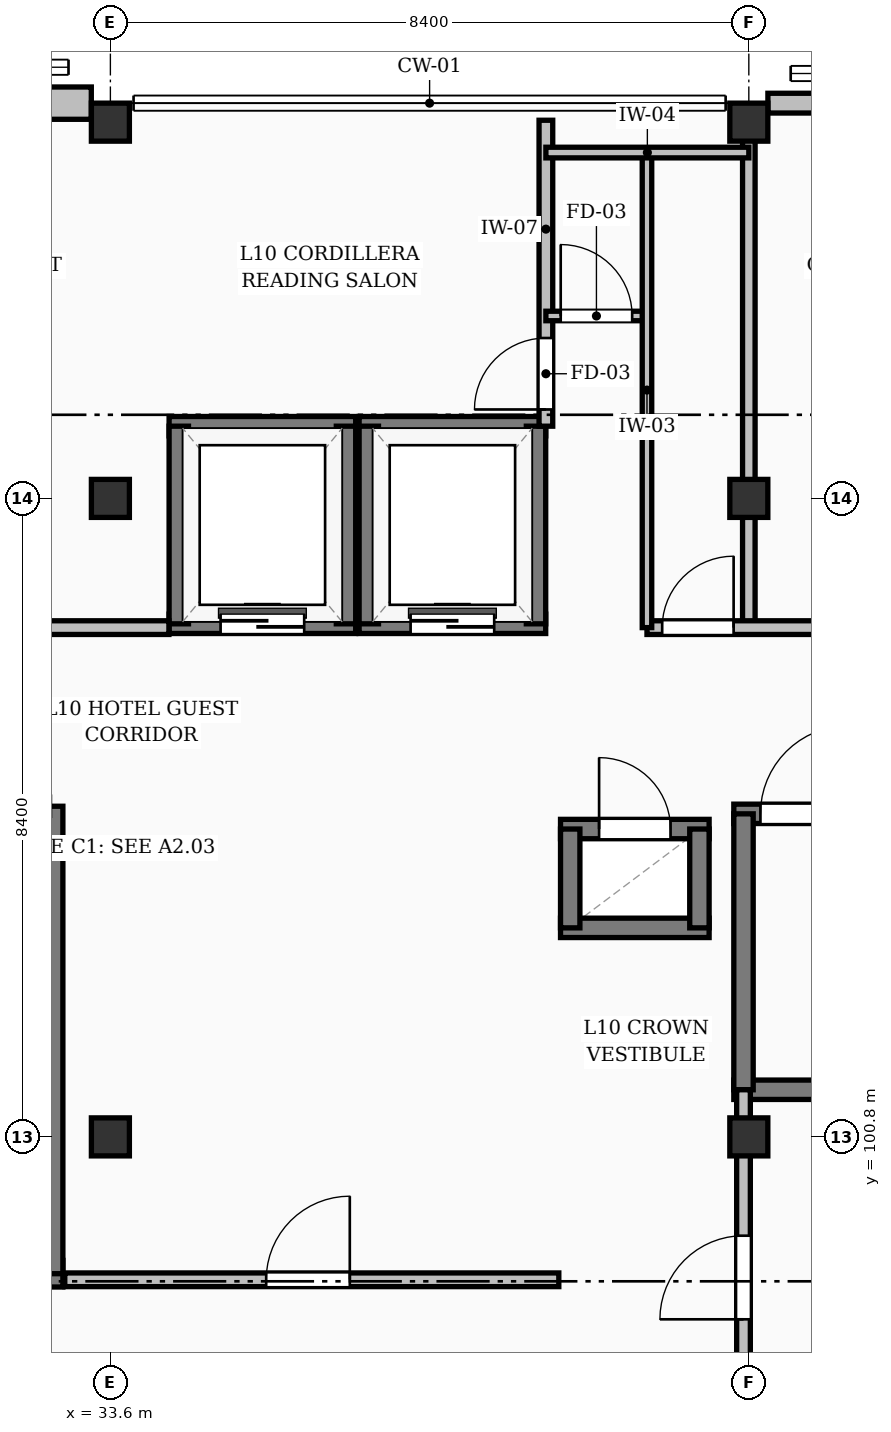
"""IFC4 building model, lengths in metres.
Left out: names, types, materials, properties, quantities, classifications, styles, units other than length and angle.
Written with IfcOpenShell. Run it as: python <this file> out.ifc"""

import sys

from ifc_helpers import new_model, si_unit, direction, frame, frame_2d, origin, origin_2d, place, context, subcontext, project, spatial, rectangle, extrude, element, fill, save


model = new_model("IFC4")
c1 = context("Model", 3, precision=1e-05, world=origin(), true_north=direction((0.0, 1.0)))
c2 = subcontext(c1, "Body", "Model", "MODEL_VIEW")
j1 = project(units=[si_unit("LENGTHUNIT", "METRE"), si_unit("PLANEANGLEUNIT", "RADIAN")], contexts=[c1])
p1 = place(None, origin())
s1 = spatial("IfcSite", under=j1, at=p1, CompositionType="ELEMENT")
p2 = place(p1, origin())
s2 = spatial("IfcBuilding", under=s1, at=p2, CompositionType="ELEMENT")
p3 = place(p2, frame((0.0, 0.0, 35.28)))
s3 = spatial("IfcBuildingStorey", under=s2, at=p3, CompositionType="ELEMENT", Elevation=35.28)
for number, where, z_axis, x_axis in (
    (1, (33.6, 100.8, 0.0), (0.0, 0.0, 1.0), (1.0, 0.0, 0.0)),
    (2, (33.6, 109.2, 0.0), (0.0, 0.0, 1.0), (1.0, 0.0, 0.0)),
    (3, (33.6, 114.15, 0.0), (0.0, 0.0, 1.0), (1.0, 0.0, 0.0)),
    (4, (42.0, 100.8, 0.0), (0.0, 0.0, 1.0), (1.0, 0.0, 0.0)),
    (5, (42.0, 109.2, 0.0), (0.0, 0.0, 1.0), (1.0, 0.0, 0.0)),
    (6, (42.0, 114.15, 0.0), (0.0, 0.0, 1.0), (1.0, 0.0, 0.0)),
):
    element("IfcColumn", number, at=place(p3, frame(where, z_axis=z_axis, x_axis=x_axis)), inside=s3, PredefinedType="COLUMN", context=c2, shape_type="SweptSolid", body=[
        extrude(rectangle(XDim=0.5, YDim=0.5, at=origin_2d()), origin(), (0.0, 0.0, 1.0), 3.36),
    ])
p4 = place(p3, frame((26.425, 99.0, 0.0), z_axis=(0.0, 0.0, 1.0), x_axis=(1.0, 0.0, 0.0)))
e7 = element("IfcWall", 7, at=p4, inside=s3, PredefinedType="SHEAR", context=c2, shape_type="SweptSolid", body=[
    extrude(rectangle(XDim=6.55, YDim=0.35, at=frame_2d((3.275, 0.0))), origin(), (0.0, 0.0, 1.0), 3.14),
])
p5 = place(p3, frame((32.8, 99.0, 0.0), z_axis=(0.0, 0.0, 1.0), x_axis=(0.0, 1.0, 0.0)))
e8 = element("IfcWall", 8, at=p5, inside=s3, PredefinedType="SHEAR", context=c2, shape_type="SweptSolid", body=[
    extrude(rectangle(XDim=6.15, YDim=0.35, at=frame_2d((3.075, 0.0))), origin(), (0.0, 0.0, 1.0), 3.14),
])
p6 = place(p3, frame((25.451, 114.4, 0.0), z_axis=(0.0, 0.0, 1.0), x_axis=(1.0, 0.0, 0.0)))
e9 = element("IfcWall", 9, at=p6, inside=s3, PredefinedType="SOLIDWALL", context=c2, shape_type="SweptSolid", body=[
    extrude(rectangle(XDim=7.898, YDim=0.425, at=frame_2d((3.949, 0.0))), origin(), (0.0, 0.0, 1.0), 2.514),
])
p7 = place(p6, frame((0.724, 0.0, 0.25)))
e10 = element("IfcOpeningElement", 10, at=p7, cuts=e9, PredefinedType="OPENING", context=c2, shape_type="SweptSolid", body=[
    extrude(rectangle(XDim=2.25, YDim=1.85, at=frame_2d((1.125, 0.925))), frame((0.0, 0.223, 0.0), z_axis=(0.0, -1.0, 0.0), x_axis=(1.0, 0.0, 0.0)), (0.0, 0.0, 1.0), 0.445),
])
p8 = place(p6, frame((4.924, 0.0, 0.25)))
e11 = element("IfcOpeningElement", 11, at=p8, cuts=e9, PredefinedType="OPENING", context=c2, shape_type="SweptSolid", body=[
    extrude(rectangle(XDim=2.25, YDim=1.95, at=frame_2d((1.125, 0.975))), frame((0.0, 0.223, 0.0), z_axis=(0.0, -1.0, 0.0), x_axis=(1.0, 0.0, 0.0)), (0.0, 0.0, 1.0), 0.445),
])
p9 = place(p3, frame((42.251, 114.4, 0.0), z_axis=(0.0, 0.0, 1.0), x_axis=(1.0, 0.0, 0.0)))
e12 = element("IfcWall", 12, at=p9, inside=s3, PredefinedType="SOLIDWALL", context=c2, shape_type="SweptSolid", body=[
    extrude(rectangle(XDim=7.898, YDim=0.26, at=frame_2d((3.949, 0.0))), origin(), (0.0, 0.0, 1.0), 2.514),
])
p10 = place(p9, frame((0.724, 0.0, 0.25)))
e13 = element("IfcOpeningElement", 13, at=p10, cuts=e12, PredefinedType="OPENING", context=c2, shape_type="SweptSolid", body=[
    extrude(rectangle(XDim=2.25, YDim=1.95, at=frame_2d((1.125, 0.975))), frame((0.0, 0.14, 0.0), z_axis=(0.0, -1.0, 0.0), x_axis=(1.0, 0.0, 0.0)), (0.0, 0.0, 1.0), 0.28),
])
p11 = place(p9, frame((4.924, 0.0, 0.25)))
e14 = element("IfcOpeningElement", 14, at=p11, cuts=e12, PredefinedType="OPENING", context=c2, shape_type="SweptSolid", body=[
    extrude(rectangle(XDim=2.25, YDim=2.05, at=frame_2d((1.125, 1.025))), frame((0.0, 0.14, 0.0), z_axis=(0.0, -1.0, 0.0), x_axis=(1.0, 0.0, 0.0)), (0.0, 0.0, 1.0), 0.28),
])
p12 = place(p3, frame((41.802, 101.42, 0.0), z_axis=(0.0, 0.0, 1.0), x_axis=(1.0, 0.0, 0.0)))
e15 = element("IfcWall", 15, at=p12, inside=s3, PredefinedType="SOLIDWALL", context=c2, shape_type="SweptSolid", body=[
    extrude(rectangle(XDim=8.225, YDim=0.255, at=frame_2d((4.113, 0.0))), origin(), (0.0, 0.0, 1.0), 3.14),
])
p13 = place(p3, frame((41.802, 105.05, 0.0), z_axis=(0.0, 0.0, 1.0), x_axis=(1.0, 0.0, 0.0)))
e16 = element("IfcWall", 16, at=p13, inside=s3, PredefinedType="SOLIDWALL", context=c2, shape_type="SweptSolid", body=[
    extrude(rectangle(XDim=8.225, YDim=0.255, at=frame_2d((4.113, 0.0))), origin(), (0.0, 0.0, 1.0), 3.14),
])
p14 = place(p13, frame((0.35, 0.0, 0.0)))
e17 = element("IfcOpeningElement", 17, at=p14, cuts=e16, PredefinedType="OPENING", context=c2, shape_type="SweptSolid", body=[
    extrude(rectangle(XDim=1.16, YDim=2.15, at=frame_2d((0.58, 1.075))), frame((0.0, 0.137, 0.0), z_axis=(0.0, -1.0, 0.0), x_axis=(1.0, 0.0, 0.0)), (0.0, 0.0, 1.0), 0.275),
])
p15 = place(p3, frame((41.93, 101.42, 0.0), z_axis=(0.0, 0.0, 1.0), x_axis=(0.0, 1.0, 0.0)))
e18 = element("IfcWall", 18, at=p15, inside=s3, PredefinedType="SOLIDWALL", context=c2, shape_type="SweptSolid", body=[
    extrude(rectangle(XDim=3.63, YDim=0.255, at=frame_2d((1.815, 0.0))), origin(), (0.0, 0.0, 1.0), 3.14),
])
p16 = place(p3, frame((34.373, 107.55, 0.0), z_axis=(0.0, 0.0, 1.0), x_axis=(1.0, 0.0, 0.0)))
e19 = element("IfcWall", 19, at=p16, inside=s3, PredefinedType="SOLIDWALL", context=c2, shape_type="SweptSolid", body=[
    extrude(rectangle(XDim=2.455, YDim=0.255, at=frame_2d((1.228, 0.0))), origin(), (0.0, 0.0, 1.0), 3.14),
])
p17 = place(p16, frame((0.677, 0.0, 0.0)))
e20 = element("IfcOpeningElement", 20, at=p17, cuts=e19, PredefinedType="OPENING", context=c2, shape_type="SweptSolid", body=[
    extrude(rectangle(XDim=1.1, YDim=2.15, at=frame_2d((0.55, 1.075))), frame((0.0, 0.137, 0.0), z_axis=(0.0, -1.0, 0.0), x_axis=(1.0, 0.0, 0.0)), (0.0, 0.0, 1.0), 0.275),
])
p18 = place(p3, frame((34.373, 110.15, 0.0), z_axis=(0.0, 0.0, 1.0), x_axis=(1.0, 0.0, 0.0)))
e21 = element("IfcWall", 21, at=p18, inside=s3, PredefinedType="SOLIDWALL", context=c2, shape_type="SweptSolid", body=[
    extrude(rectangle(XDim=2.455, YDim=0.255, at=frame_2d((1.228, 0.0))), origin(), (0.0, 0.0, 1.0), 3.14),
])
for number, where, z_axis, x_axis in (
    (22, (34.5, 107.55, 0.0), (0.0, 0.0, 1.0), (0.0, 1.0, 0.0)),
    (23, (36.7, 107.55, 0.0), (0.0, 0.0, 1.0), (0.0, 1.0, 0.0)),
):
    element("IfcWall", number, at=place(p3, frame(where, z_axis=z_axis, x_axis=x_axis)), inside=s3, PredefinedType="SOLIDWALL", context=c2, shape_type="SweptSolid", body=[
        extrude(rectangle(XDim=2.6, YDim=0.255, at=frame_2d((1.3, 0.0))), origin(), (0.0, 0.0, 1.0), 3.14),
    ])
p19 = place(p3, frame((36.873, 107.55, 0.0), z_axis=(0.0, 0.0, 1.0), x_axis=(1.0, 0.0, 0.0)))
e24 = element("IfcWall", 24, at=p19, inside=s3, PredefinedType="SOLIDWALL", context=c2, shape_type="SweptSolid", body=[
    extrude(rectangle(XDim=2.455, YDim=0.255, at=frame_2d((1.228, 0.0))), origin(), (0.0, 0.0, 1.0), 3.14),
])
p20 = place(p19, frame((0.677, 0.0, 0.0)))
e25 = element("IfcOpeningElement", 25, at=p20, cuts=e24, PredefinedType="OPENING", context=c2, shape_type="SweptSolid", body=[
    extrude(rectangle(XDim=1.1, YDim=2.15, at=frame_2d((0.55, 1.075))), frame((0.0, 0.137, 0.0), z_axis=(0.0, -1.0, 0.0), x_axis=(1.0, 0.0, 0.0)), (0.0, 0.0, 1.0), 0.275),
])
p21 = place(p3, frame((36.873, 110.15, 0.0), z_axis=(0.0, 0.0, 1.0), x_axis=(1.0, 0.0, 0.0)))
e26 = element("IfcWall", 26, at=p21, inside=s3, PredefinedType="SOLIDWALL", context=c2, shape_type="SweptSolid", body=[
    extrude(rectangle(XDim=2.455, YDim=0.255, at=frame_2d((1.228, 0.0))), origin(), (0.0, 0.0, 1.0), 3.14),
])
for number, where, z_axis, x_axis in (
    (27, (37.0, 107.55, 0.0), (0.0, 0.0, 1.0), (0.0, 1.0, 0.0)),
    (28, (39.2, 107.55, 0.0), (0.0, 0.0, 1.0), (0.0, 1.0, 0.0)),
):
    element("IfcWall", number, at=place(p3, frame(where, z_axis=z_axis, x_axis=x_axis)), inside=s3, PredefinedType="SOLIDWALL", context=c2, shape_type="SweptSolid", body=[
        extrude(rectangle(XDim=2.6, YDim=0.255, at=frame_2d((1.3, 0.0))), origin(), (0.0, 0.0, 1.0), 3.14),
    ])
p22 = place(p3, frame((39.522, 103.55, 0.0), z_axis=(0.0, 0.0, 1.0), x_axis=(1.0, 0.0, 0.0)))
e29 = element("IfcWall", 29, at=p22, inside=s3, PredefinedType="SOLIDWALL", context=c2, shape_type="SweptSolid", body=[
    extrude(rectangle(XDim=1.955, YDim=0.255, at=frame_2d((0.978, 0.0))), origin(), (0.0, 0.0, 1.0), 3.14),
])
p23 = place(p3, frame((39.522, 104.85, 0.0), z_axis=(0.0, 0.0, 1.0), x_axis=(1.0, 0.0, 0.0)))
e30 = element("IfcWall", 30, at=p23, inside=s3, PredefinedType="SOLIDWALL", context=c2, shape_type="SweptSolid", body=[
    extrude(rectangle(XDim=1.955, YDim=0.255, at=frame_2d((0.978, 0.0))), origin(), (0.0, 0.0, 1.0), 3.14),
])
p24 = place(p23, frame((0.508, 0.0, 0.0)))
e31 = element("IfcOpeningElement", 31, at=p24, cuts=e30, PredefinedType="OPENING", context=c2, shape_type="SweptSolid", body=[
    extrude(rectangle(XDim=0.94, YDim=2.1, at=frame_2d((0.47, 1.05))), frame((0.0, 0.137, 0.0), z_axis=(0.0, -1.0, 0.0), x_axis=(1.0, 0.0, 0.0)), (0.0, 0.0, 1.0), 0.275),
])
for number, where, z_axis, x_axis in (
    (32, (39.65, 103.55, 0.0), (0.0, 0.0, 1.0), (0.0, 1.0, 0.0)),
    (33, (41.35, 103.55, 0.0), (0.0, 0.0, 1.0), (0.0, 1.0, 0.0)),
):
    element("IfcWall", number, at=place(p3, frame(where, z_axis=z_axis, x_axis=x_axis)), inside=s3, PredefinedType="SOLIDWALL", context=c2, shape_type="SweptSolid", body=[
        extrude(rectangle(XDim=1.3, YDim=0.255, at=frame_2d((0.65, 0.0))), origin(), (0.0, 0.0, 1.0), 3.14),
    ])
p25 = place(p3, frame((42.0, 107.5, 0.0), z_axis=(0.0, 0.0, 1.0), x_axis=(0.0, 1.0, 0.0)))
e34 = element("IfcWall", 34, at=p25, inside=s3, PredefinedType="PARTITIONING", context=c2, shape_type="SweptSolid", body=[
    extrude(rectangle(XDim=6.55, YDim=0.165, at=frame_2d((3.275, 0.0))), origin(), (0.0, 0.0, 1.0), 2.514),
])
p26 = place(p3, frame((8.59, 107.5, 0.0), z_axis=(0.0, 0.0, 1.0), x_axis=(1.0, 0.0, 0.0)))
e35 = element("IfcWall", 35, at=p26, inside=s3, PredefinedType="PARTITIONING", context=c2, shape_type="SweptSolid", body=[
    extrude(rectangle(XDim=25.78, YDim=0.18, at=frame_2d((12.89, 0.0))), origin(), (0.0, 0.0, 1.0), 3.14),
])
p27 = place(p26, frame((1.31, 0.0, 0.0)))
e36 = element("IfcOpeningElement", 36, at=p27, cuts=e35, PredefinedType="OPENING", context=c2, shape_type="SweptSolid", body=[
    extrude(rectangle(XDim=1.02, YDim=2.15, at=frame_2d((0.51, 1.075))), frame((0.0, 0.1, 0.0), z_axis=(0.0, -1.0, 0.0), x_axis=(1.0, 0.0, 0.0)), (0.0, 0.0, 1.0), 0.2),
])
p28 = place(p26, frame((9.58, 0.0, 0.0)))
e37 = element("IfcOpeningElement", 37, at=p28, cuts=e35, PredefinedType="OPENING", context=c2, shape_type="SweptSolid", body=[
    extrude(rectangle(XDim=0.96, YDim=2.15, at=frame_2d((0.48, 1.075))), frame((0.0, 0.1, 0.0), z_axis=(0.0, -1.0, 0.0), x_axis=(1.0, 0.0, 0.0)), (0.0, 0.0, 1.0), 0.2),
])
p29 = place(p26, frame((14.24, 0.0, 0.0)))
e38 = element("IfcOpeningElement", 38, at=p29, cuts=e35, PredefinedType="OPENING", context=c2, shape_type="SweptSolid", body=[
    extrude(rectangle(XDim=0.96, YDim=2.15, at=frame_2d((0.48, 1.075))), frame((0.0, 0.1, 0.0), z_axis=(0.0, -1.0, 0.0), x_axis=(1.0, 0.0, 0.0)), (0.0, 0.0, 1.0), 0.2),
])
p30 = place(p26, frame((17.98, 0.0, 0.0)))
e39 = element("IfcOpeningElement", 39, at=p30, cuts=e35, PredefinedType="OPENING", context=c2, shape_type="SweptSolid", body=[
    extrude(rectangle(XDim=0.96, YDim=2.15, at=frame_2d((0.48, 1.075))), frame((0.0, 0.1, 0.0), z_axis=(0.0, -1.0, 0.0), x_axis=(1.0, 0.0, 0.0)), (0.0, 0.0, 1.0), 0.2),
])
p31 = place(p26, frame((22.64, 0.0, 0.0)))
e40 = element("IfcOpeningElement", 40, at=p31, cuts=e35, PredefinedType="OPENING", context=c2, shape_type="SweptSolid", body=[
    extrude(rectangle(XDim=0.96, YDim=2.15, at=frame_2d((0.48, 1.075))), frame((0.0, 0.1, 0.0), z_axis=(0.0, -1.0, 0.0), x_axis=(1.0, 0.0, 0.0)), (0.0, 0.0, 1.0), 0.2),
])
p32 = place(p3, frame((40.66, 107.5, 0.0), z_axis=(0.0, 0.0, 1.0), x_axis=(1.0, 0.0, 0.0)))
e41 = element("IfcWall", 41, at=p32, inside=s3, PredefinedType="PARTITIONING", context=c2, shape_type="SweptSolid", body=[
    extrude(rectangle(XDim=9.55, YDim=0.18, at=frame_2d((4.775, 0.0))), origin(), (0.0, 0.0, 1.0), 3.14),
])
p33 = place(p32, frame((0.2, 0.0, 0.0)))
e42 = element("IfcOpeningElement", 42, at=p33, cuts=e41, PredefinedType="OPENING", context=c2, shape_type="SweptSolid", body=[
    extrude(rectangle(XDim=0.94, YDim=2.1, at=frame_2d((0.47, 1.05))), frame((0.0, 0.1, 0.0), z_axis=(0.0, -1.0, 0.0), x_axis=(1.0, 0.0, 0.0)), (0.0, 0.0, 1.0), 0.2),
])
p34 = place(p32, frame((2.71, 0.0, 0.0)))
e43 = element("IfcOpeningElement", 43, at=p34, cuts=e41, PredefinedType="OPENING", context=c2, shape_type="SweptSolid", body=[
    extrude(rectangle(XDim=0.96, YDim=2.15, at=frame_2d((0.48, 1.075))), frame((0.0, 0.1, 0.0), z_axis=(0.0, -1.0, 0.0), x_axis=(1.0, 0.0, 0.0)), (0.0, 0.0, 1.0), 0.2),
])
p35 = place(p32, frame((7.37, 0.0, 0.0)))
e44 = element("IfcOpeningElement", 44, at=p35, cuts=e41, PredefinedType="OPENING", context=c2, shape_type="SweptSolid", body=[
    extrude(rectangle(XDim=0.96, YDim=2.15, at=frame_2d((0.48, 1.075))), frame((0.0, 0.1, 0.0), z_axis=(0.0, -1.0, 0.0), x_axis=(1.0, 0.0, 0.0)), (0.0, 0.0, 1.0), 0.2),
])
p36 = place(p3, frame((39.33, 110.15, 0.0), z_axis=(0.0, 0.0, 1.0), x_axis=(0.0, 1.0, 0.0)))
e45 = element("IfcWall", 45, at=p36, inside=s3, PredefinedType="PARTITIONING", context=c2, shape_type="SweptSolid", body=[
    extrude(rectangle(XDim=4.025, YDim=0.18, at=frame_2d((2.013, 0.0))), origin(), (0.0, 0.0, 1.0), 3.14),
])
p37 = place(p36, frame((0.22, 0.0, 0.0)))
e46 = element("IfcOpeningElement", 46, at=p37, cuts=e45, PredefinedType="OPENING", context=c2, shape_type="SweptSolid", body=[
    extrude(rectangle(XDim=0.94, YDim=2.1, at=frame_2d((0.47, 1.05))), frame((0.0, 0.1, 0.0), z_axis=(0.0, -1.0, 0.0), x_axis=(1.0, 0.0, 0.0)), (0.0, 0.0, 1.0), 0.2),
])
p38 = place(p3, frame((39.33, 111.6, 0.0), z_axis=(0.0, 0.0, 1.0), x_axis=(1.0, 0.0, 0.0)))
e47 = element("IfcWall", 47, at=p38, inside=s3, PredefinedType="PARTITIONING", context=c2, shape_type="SweptSolid", body=[
    extrude(rectangle(XDim=1.33, YDim=0.125, at=frame_2d((0.665, 0.0))), origin(), (0.0, 0.0, 1.0), 3.14),
])
p39 = place(p38, frame((0.195, 0.0, 0.0)))
e48 = element("IfcOpeningElement", 48, at=p39, cuts=e47, PredefinedType="OPENING", context=c2, shape_type="SweptSolid", body=[
    extrude(rectangle(XDim=0.94, YDim=2.1, at=frame_2d((0.47, 1.05))), frame((0.0, 0.073, 0.0), z_axis=(0.0, -1.0, 0.0), x_axis=(1.0, 0.0, 0.0)), (0.0, 0.0, 1.0), 0.145),
])
p40 = place(p3, frame((40.66, 107.5, 0.0), z_axis=(0.0, 0.0, 1.0), x_axis=(0.0, 1.0, 0.0)))
e49 = element("IfcWall", 49, at=p40, inside=s3, PredefinedType="PARTITIONING", context=c2, shape_type="SweptSolid", body=[
    extrude(rectangle(XDim=6.25, YDim=0.125, at=frame_2d((3.125, 0.0))), origin(), (0.0, 0.0, 1.0), 3.14),
])
p41 = place(p3, frame((39.33, 113.75, 0.0), z_axis=(0.0, 0.0, 1.0), x_axis=(1.0, 0.0, 0.0)))
e50 = element("IfcWall", 50, at=p41, inside=s3, PredefinedType="PARTITIONING", context=c2, shape_type="SweptSolid", body=[
    extrude(rectangle(XDim=2.67, YDim=0.14, at=frame_2d((1.335, 0.0))), origin(), (0.0, 0.0, 1.0), 3.14),
])
p42 = place(p3, frame((33.0, 98.92, 0.0), z_axis=(0.0, 0.0, 1.0), x_axis=(1.0, 0.0, 0.0)))
e51 = element("IfcWall", 51, at=p42, inside=s3, PredefinedType="PARTITIONING", context=c2, shape_type="SweptSolid", body=[
    extrude(rectangle(XDim=6.5, YDim=0.18, at=frame_2d((3.25, 0.0))), origin(), (0.0, 0.0, 1.0), 3.14),
])
p43 = place(p42, frame((2.65, 0.0, 0.0)))
e52 = element("IfcOpeningElement", 52, at=p43, cuts=e51, PredefinedType="OPENING", context=c2, shape_type="SweptSolid", body=[
    extrude(rectangle(XDim=1.1, YDim=2.1, at=frame_2d((0.55, 1.05))), frame((0.0, 0.1, 0.0), z_axis=(0.0, -1.0, 0.0), x_axis=(1.0, 0.0, 0.0)), (0.0, 0.0, 1.0), 0.2),
])
p44 = place(p3, frame((41.93, 97.0, 0.0), z_axis=(0.0, 0.0, 1.0), x_axis=(0.0, 1.0, 0.0)))
e53 = element("IfcWall", 53, at=p44, inside=s3, PredefinedType="PARTITIONING", context=c2, shape_type="SweptSolid", body=[
    extrude(rectangle(XDim=4.42, YDim=0.18, at=frame_2d((2.21, 0.0))), origin(), (0.0, 0.0, 1.0), 2.514),
])
p45 = place(p44, frame((1.4, 0.0, 0.0)))
e54 = element("IfcOpeningElement", 54, at=p45, cuts=e53, PredefinedType="OPENING", context=c2, shape_type="SweptSolid", body=[
    extrude(rectangle(XDim=1.1, YDim=2.1, at=frame_2d((0.55, 1.05))), frame((0.0, 0.1, 0.0), z_axis=(0.0, -1.0, 0.0), x_axis=(1.0, 0.0, 0.0)), (0.0, 0.0, 1.0), 0.2),
])
p46 = place(p14, origin())
e55 = element("IfcDoor", 55, at=p46, inside=s3, OperationType="SINGLE_SWING_RIGHT", PredefinedType="DOOR", context=c2, shape_type="SweptSolid", body=[
    extrude(rectangle(XDim=1.16, YDim=2.15, at=frame_2d((0.58, 1.075))), frame((0.0, 0.025, 0.0), z_axis=(0.0, -1.0, 0.0), x_axis=(1.0, 0.0, 0.0)), (0.0, 0.0, 1.0), 0.05),
])
fill(e17, e55)
p47 = place(p17, origin())
e56 = element("IfcDoor", 56, at=p47, inside=s3, OperationType="DOUBLE_DOOR_SLIDING", PredefinedType="DOOR", context=c2, shape_type="SweptSolid", body=[
    extrude(rectangle(XDim=1.1, YDim=2.15, at=frame_2d((0.55, 1.075))), frame((0.0, 0.025, 0.0), z_axis=(0.0, -1.0, 0.0), x_axis=(1.0, 0.0, 0.0)), (0.0, 0.0, 1.0), 0.05),
])
fill(e20, e56)
p48 = place(p20, origin())
e57 = element("IfcDoor", 57, at=p48, inside=s3, OperationType="DOUBLE_DOOR_SLIDING", PredefinedType="DOOR", context=c2, shape_type="SweptSolid", body=[
    extrude(rectangle(XDim=1.1, YDim=2.15, at=frame_2d((0.55, 1.075))), frame((0.0, 0.025, 0.0), z_axis=(0.0, -1.0, 0.0), x_axis=(1.0, 0.0, 0.0)), (0.0, 0.0, 1.0), 0.05),
])
fill(e25, e57)
p49 = place(p24, origin())
e58 = element("IfcDoor", 58, at=p49, inside=s3, OperationType="SINGLE_SWING_LEFT", PredefinedType="DOOR", context=c2, shape_type="SweptSolid", body=[
    extrude(rectangle(XDim=0.94, YDim=2.1, at=frame_2d((0.47, 1.05))), frame((0.0, 0.025, 0.0), z_axis=(0.0, -1.0, 0.0), x_axis=(1.0, 0.0, 0.0)), (0.0, 0.0, 1.0), 0.05),
])
fill(e31, e58)
p50 = place(p33, origin())
e59 = element("IfcDoor", 59, at=p50, inside=s3, OperationType="SINGLE_SWING_RIGHT", PredefinedType="DOOR", context=c2, shape_type="SweptSolid", body=[
    extrude(rectangle(XDim=0.94, YDim=2.1, at=frame_2d((0.47, 1.05))), frame((0.0, 0.025, 0.0), z_axis=(0.0, -1.0, 0.0), x_axis=(1.0, 0.0, 0.0)), (0.0, 0.0, 1.0), 0.05),
])
fill(e42, e59)
p51 = place(p37, origin())
e60 = element("IfcDoor", 60, at=p51, inside=s3, OperationType="SINGLE_SWING_LEFT", PredefinedType="DOOR", context=c2, shape_type="SweptSolid", body=[
    extrude(rectangle(XDim=0.94, YDim=2.1, at=frame_2d((0.47, 1.05))), frame((0.0, 0.025, 0.0), z_axis=(0.0, -1.0, 0.0), x_axis=(1.0, 0.0, 0.0)), (0.0, 0.0, 1.0), 0.05),
])
fill(e46, e60)
p52 = place(p39, origin())
e61 = element("IfcDoor", 61, at=p52, inside=s3, OperationType="SINGLE_SWING_LEFT", PredefinedType="DOOR", context=c2, shape_type="SweptSolid", body=[
    extrude(rectangle(XDim=0.94, YDim=2.1, at=frame_2d((0.47, 1.05))), frame((0.0, 0.025, 0.0), z_axis=(0.0, -1.0, 0.0), x_axis=(1.0, 0.0, 0.0)), (0.0, 0.0, 1.0), 0.05),
])
fill(e48, e61)
p53 = place(p43, origin())
e62 = element("IfcDoor", 62, at=p53, inside=s3, OperationType="SINGLE_SWING_RIGHT", PredefinedType="DOOR", context=c2, shape_type="SweptSolid", body=[
    extrude(rectangle(XDim=1.1, YDim=2.1, at=frame_2d((0.55, 1.05))), frame((0.0, 0.025, 0.0), z_axis=(0.0, -1.0, 0.0), x_axis=(1.0, 0.0, 0.0)), (0.0, 0.0, 1.0), 0.05),
])
fill(e52, e62)
p54 = place(p45, origin())
e63 = element("IfcDoor", 63, at=p54, inside=s3, OperationType="SINGLE_SWING_LEFT", PredefinedType="DOOR", context=c2, shape_type="SweptSolid", body=[
    extrude(rectangle(XDim=1.1, YDim=2.1, at=frame_2d((0.55, 1.05))), frame((0.0, 0.025, 0.0), z_axis=(0.0, -1.0, 0.0), x_axis=(1.0, 0.0, 0.0)), (0.0, 0.0, 1.0), 0.05),
])
fill(e54, e63)
save(model, sys.argv[1])
